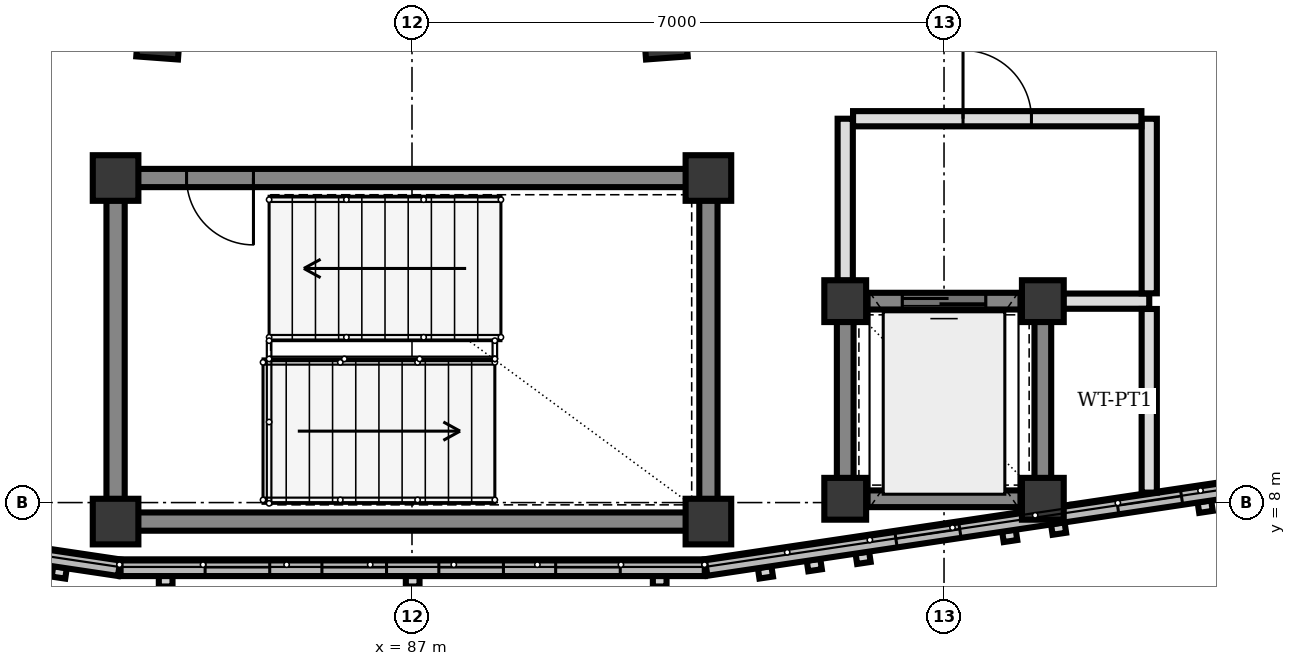
"""IFC4 building model, lengths in metres.
Left out: names, types, materials, properties, quantities, classifications, styles, units other than length and angle.
Written with IfcOpenShell. Run it as: python <this file> out.ifc"""

import sys

from ifc_helpers import new_model, si_unit, direction, frame, frame_2d, origin, origin_2d, place, context, subcontext, project, spatial, rectangle, extrude, element, fill, save


model = new_model("IFC4")
c1 = context("Model", 3, precision=1e-05, world=origin(), true_north=direction((0.0, 1.0)))
c2 = subcontext(c1, "Body", "Model", "MODEL_VIEW")
j1 = project(units=[si_unit("LENGTHUNIT", "METRE"), si_unit("PLANEANGLEUNIT", "RADIAN")], contexts=[c1])
p1 = place(None, origin())
s1 = spatial("IfcSite", under=j1, at=p1, CompositionType="ELEMENT")
p2 = place(p1, origin())
s2 = spatial("IfcBuilding", under=s1, at=p2, CompositionType="ELEMENT")
p3 = place(p2, frame((0.0, 0.0, 8.5)))
s3 = spatial("IfcBuildingStorey", under=s2, at=p3, CompositionType="ELEMENT", Elevation=8.5)
for number, where, z_axis, x_axis in (
    (1, (83.1, 7.75, 0.0), (0.0, 0.0, 1.0), (1.0, 0.0, 0.0)),
    (2, (90.9, 7.75, 0.0), (0.0, 0.0, 1.0), (1.0, 0.0, 0.0)),
    (3, (90.9, 12.27, 0.0), (0.0, 0.0, 1.0), (1.0, 0.0, 0.0)),
    (4, (83.1, 12.27, 0.0), (0.0, 0.0, 1.0), (1.0, 0.0, 0.0)),
):
    element("IfcColumn", number, at=place(p3, frame(where, z_axis=z_axis, x_axis=x_axis)), inside=s3, PredefinedType="COLUMN", context=c2, shape_type="SweptSolid", body=[
        extrude(rectangle(XDim=0.6, YDim=0.6, at=origin_2d()), origin(), (0.0, 0.0, 1.0), 4.0),
    ])
for number, where, z_axis, x_axis in (
    (5, (92.7, 8.05, 0.0), (0.0, 0.0, 1.0), (1.0, 0.0, 0.0)),
    (6, (95.3, 8.05, 0.0), (0.0, 0.0, 1.0), (1.0, 0.0, 0.0)),
    (7, (95.3, 10.65, 0.0), (0.0, 0.0, 1.0), (1.0, 0.0, 0.0)),
    (8, (92.7, 10.65, 0.0), (0.0, 0.0, 1.0), (1.0, 0.0, 0.0)),
    (9, (83.667, 14.124, 0.0), (0.0, 0.0, 1.0), (-0.074, -0.997, 0.0)),
    (10, (90.333, 14.124, 0.0), (0.0, 0.0, 1.0), (0.074, -0.997, 0.0)),
):
    element("IfcColumn", number, at=place(p3, frame(where, z_axis=z_axis, x_axis=x_axis)), inside=s3, PredefinedType="COLUMN", context=c2, shape_type="SweptSolid", body=[
        extrude(rectangle(XDim=0.55, YDim=0.55, at=origin_2d()), origin(), (0.0, 0.0, 1.0), 4.0),
    ])
p4 = place(p3, frame((83.148, 7.143, 0.0), z_axis=(0.0, 0.0, 1.0), x_axis=(-0.989027735747, 0.147729949309, 0.0)))
e11 = element("IfcWall", 11, at=p4, inside=s3, PredefinedType="SOLIDWALL", context=c2, shape_type="SweptSolid", body=[
    extrude(rectangle(XDim=7.392, YDim=0.22, at=frame_2d((3.696, 0.0))), origin(), (0.0, 0.0, 1.0), 3.55),
])
p5 = place(p4, frame((1.053, 0.0, 0.85)))
e12 = element("IfcOpeningElement", 12, at=p5, cuts=e11, PredefinedType="OPENING", context=c2, shape_type="SweptSolid", body=[
    extrude(rectangle(XDim=0.85, YDim=1.25, at=frame_2d((0.425, 0.625))), frame((0.0, 0.12, 0.0), z_axis=(0.0, -1.0, 0.0), x_axis=(1.0, 0.0, 0.0)), (0.0, 0.0, 1.0), 0.24),
])
p6 = place(p4, frame((2.532, 0.0, 0.85)))
e13 = element("IfcOpeningElement", 13, at=p6, cuts=e11, PredefinedType="OPENING", context=c2, shape_type="SweptSolid", body=[
    extrude(rectangle(XDim=0.85, YDim=1.25, at=frame_2d((0.425, 0.625))), frame((0.0, 0.12, 0.0), z_axis=(0.0, -1.0, 0.0), x_axis=(1.0, 0.0, 0.0)), (0.0, 0.0, 1.0), 0.24),
])
p7 = place(p4, frame((4.01, 0.0, 0.85)))
e14 = element("IfcOpeningElement", 14, at=p7, cuts=e11, PredefinedType="OPENING", context=c2, shape_type="SweptSolid", body=[
    extrude(rectangle(XDim=0.85, YDim=1.25, at=frame_2d((0.425, 0.625))), frame((0.0, 0.12, 0.0), z_axis=(0.0, -1.0, 0.0), x_axis=(1.0, 0.0, 0.0)), (0.0, 0.0, 1.0), 0.24),
])
p8 = place(p4, frame((5.489, 0.0, 0.85)))
e15 = element("IfcOpeningElement", 15, at=p8, cuts=e11, PredefinedType="OPENING", context=c2, shape_type="SweptSolid", body=[
    extrude(rectangle(XDim=0.85, YDim=1.25, at=frame_2d((0.425, 0.625))), frame((0.0, 0.12, 0.0), z_axis=(0.0, -1.0, 0.0), x_axis=(1.0, 0.0, 0.0)), (0.0, 0.0, 1.0), 0.24),
])
p9 = place(p3, frame((90.852, 7.143, 0.0), z_axis=(0.0, 0.0, 1.0), x_axis=(-1.0, 0.0, 0.0)))
e16 = element("IfcWall", 16, at=p9, inside=s3, PredefinedType="SOLIDWALL", context=c2, shape_type="SweptSolid", body=[
    extrude(rectangle(XDim=7.686, YDim=0.22, at=frame_2d((3.843, 0.0))), origin(), (0.0, 0.0, 1.0), 3.55),
])
p10 = place(p9, frame((1.112, 0.0, 0.85)))
e17 = element("IfcOpeningElement", 17, at=p10, cuts=e16, PredefinedType="OPENING", context=c2, shape_type="SweptSolid", body=[
    extrude(rectangle(XDim=0.85, YDim=1.25, at=frame_2d((0.425, 0.625))), frame((0.0, 0.12, 0.0), z_axis=(0.0, -1.0, 0.0), x_axis=(1.0, 0.0, 0.0)), (0.0, 0.0, 1.0), 0.24),
])
p11 = place(p9, frame((2.649, 0.0, 0.85)))
e18 = element("IfcOpeningElement", 18, at=p11, cuts=e16, PredefinedType="OPENING", context=c2, shape_type="SweptSolid", body=[
    extrude(rectangle(XDim=0.85, YDim=1.25, at=frame_2d((0.425, 0.625))), frame((0.0, 0.12, 0.0), z_axis=(0.0, -1.0, 0.0), x_axis=(1.0, 0.0, 0.0)), (0.0, 0.0, 1.0), 0.24),
])
p12 = place(p9, frame((4.187, 0.0, 0.85)))
e19 = element("IfcOpeningElement", 19, at=p12, cuts=e16, PredefinedType="OPENING", context=c2, shape_type="SweptSolid", body=[
    extrude(rectangle(XDim=0.85, YDim=1.25, at=frame_2d((0.425, 0.625))), frame((0.0, 0.12, 0.0), z_axis=(0.0, -1.0, 0.0), x_axis=(1.0, 0.0, 0.0)), (0.0, 0.0, 1.0), 0.24),
])
p13 = place(p9, frame((5.724, 0.0, 0.85)))
e20 = element("IfcOpeningElement", 20, at=p13, cuts=e16, PredefinedType="OPENING", context=c2, shape_type="SweptSolid", body=[
    extrude(rectangle(XDim=0.85, YDim=1.25, at=frame_2d((0.425, 0.625))), frame((0.0, 0.12, 0.0), z_axis=(0.0, -1.0, 0.0), x_axis=(1.0, 0.0, 0.0)), (0.0, 0.0, 1.0), 0.24),
])
p14 = place(p3, frame((98.163, 8.235, 0.0), z_axis=(0.0, 0.0, 1.0), x_axis=(-0.989032314976, -0.147699288869, 0.0)))
e21 = element("IfcWall", 21, at=p14, inside=s3, PredefinedType="SOLIDWALL", context=c2, shape_type="SweptSolid", body=[
    extrude(rectangle(XDim=7.374, YDim=0.22, at=frame_2d((3.687, 0.0))), origin(), (0.0, 0.0, 1.0), 3.55),
])
p15 = place(p14, frame((1.05, 0.0, 0.85)))
e22 = element("IfcOpeningElement", 22, at=p15, cuts=e21, PredefinedType="OPENING", context=c2, shape_type="SweptSolid", body=[
    extrude(rectangle(XDim=0.85, YDim=1.25, at=frame_2d((0.425, 0.625))), frame((0.0, 0.12, 0.0), z_axis=(0.0, -1.0, 0.0), x_axis=(1.0, 0.0, 0.0)), (0.0, 0.0, 1.0), 0.24),
])
p16 = place(p14, frame((3.999, 0.0, 0.85)))
e23 = element("IfcOpeningElement", 23, at=p16, cuts=e21, PredefinedType="OPENING", context=c2, shape_type="SweptSolid", body=[
    extrude(rectangle(XDim=0.85, YDim=1.25, at=frame_2d((0.425, 0.625))), frame((0.0, 0.12, 0.0), z_axis=(0.0, -1.0, 0.0), x_axis=(1.0, 0.0, 0.0)), (0.0, 0.0, 1.0), 0.24),
])
for number, where, z_axis, x_axis in (
    (24, (83.1, 8.042, 0.0), (0.0, 0.0, 1.0), (0.0, 1.0, 0.0)),
    (25, (90.9, 11.978, 0.0), (0.0, 0.0, 1.0), (0.0, -1.0, 0.0)),
):
    element("IfcWall", number, at=place(p3, frame(where, z_axis=z_axis, x_axis=x_axis)), inside=s3, PredefinedType="SHEAR", context=c2, shape_type="SweptSolid", body=[
        extrude(rectangle(XDim=3.936, YDim=0.24, at=frame_2d((1.968, 0.0))), origin(), (0.0, 0.0, 1.0), 3.74),
    ])
p17 = place(p3, frame((90.608, 7.75, 0.0), z_axis=(0.0, 0.0, 1.0), x_axis=(-1.0, 0.0, 0.0)))
e26 = element("IfcWall", 26, at=p17, inside=s3, PredefinedType="SHEAR", context=c2, shape_type="SweptSolid", body=[
    extrude(rectangle(XDim=7.216, YDim=0.24, at=frame_2d((3.608, 0.0))), origin(), (0.0, 0.0, 1.0), 3.74),
])
p18 = place(p3, frame((90.608, 12.27, 0.0), z_axis=(0.0, 0.0, 1.0), x_axis=(-1.0, 0.0, 0.0)))
e27 = element("IfcWall", 27, at=p18, inside=s3, PredefinedType="SHEAR", context=c2, shape_type="SweptSolid", body=[
    extrude(rectangle(XDim=7.216, YDim=0.24, at=frame_2d((3.608, 0.0))), origin(), (0.0, 0.0, 1.0), 3.74),
])
p19 = place(p18, frame((5.694, 0.0, 0.0)))
e28 = element("IfcOpeningElement", 28, at=p19, cuts=e27, PredefinedType="OPENING", context=c2, shape_type="SweptSolid", body=[
    extrude(rectangle(XDim=0.88, YDim=2.1, at=frame_2d((0.44, 1.05))), frame((0.0, 0.13, 0.0), z_axis=(0.0, -1.0, 0.0), x_axis=(1.0, 0.0, 0.0)), (0.0, 0.0, 1.0), 0.26),
])
p20 = place(p3, frame((92.967, 8.05, 0.0), z_axis=(0.0, 0.0, 1.0), x_axis=(1.0, 0.0, 0.0)))
e29 = element("IfcWall", 29, at=p20, inside=s3, PredefinedType="SHEAR", context=c2, shape_type="SweptSolid", body=[
    extrude(rectangle(XDim=2.066, YDim=0.22, at=frame_2d((1.033, 0.0))), origin(), (0.0, 0.0, 1.0), 3.74),
])
p21 = place(p3, frame((95.3, 8.317, 0.0), z_axis=(0.0, 0.0, 1.0), x_axis=(0.0, 1.0, 0.0)))
e30 = element("IfcWall", 30, at=p21, inside=s3, PredefinedType="SHEAR", context=c2, shape_type="SweptSolid", body=[
    extrude(rectangle(XDim=2.066, YDim=0.22, at=frame_2d((1.033, 0.0))), origin(), (0.0, 0.0, 1.0), 3.74),
])
p22 = place(p3, frame((95.033, 10.65, 0.0), z_axis=(0.0, 0.0, 1.0), x_axis=(-1.0, 0.0, 0.0)))
e31 = element("IfcWall", 31, at=p22, inside=s3, PredefinedType="SHEAR", context=c2, shape_type="SweptSolid", body=[
    extrude(rectangle(XDim=2.066, YDim=0.22, at=frame_2d((1.033, 0.0))), origin(), (0.0, 0.0, 1.0), 3.74),
])
p23 = place(p22, frame((0.483, 0.0, 0.0)))
e32 = element("IfcOpeningElement", 32, at=p23, cuts=e31, PredefinedType="OPENING", context=c2, shape_type="SweptSolid", body=[
    extrude(rectangle(XDim=1.1, YDim=2.15, at=frame_2d((0.55, 1.075))), frame((0.0, 0.12, 0.0), z_axis=(0.0, -1.0, 0.0), x_axis=(1.0, 0.0, 0.0)), (0.0, 0.0, 1.0), 0.24),
])
p24 = place(p3, frame((92.7, 10.383, 0.0), z_axis=(0.0, 0.0, 1.0), x_axis=(0.0, -1.0, 0.0)))
e33 = element("IfcWall", 33, at=p24, inside=s3, PredefinedType="SHEAR", context=c2, shape_type="SweptSolid", body=[
    extrude(rectangle(XDim=2.066, YDim=0.22, at=frame_2d((1.033, 0.0))), origin(), (0.0, 0.0, 1.0), 3.74),
])
p25 = place(p3, frame((92.7, 10.917, 0.0), z_axis=(0.0, 0.0, 1.0), x_axis=(0.0, 1.0, 0.0)))
e34 = element("IfcWall", 34, at=p25, inside=s3, PredefinedType="PARTITIONING", context=c2, shape_type="SweptSolid", body=[
    extrude(rectangle(XDim=2.133, YDim=0.2, at=frame_2d((1.066, 0.0))), origin(), (0.0, 0.0, 1.0), 3.7),
])
p26 = place(p3, frame((95.567, 10.65, 0.0), z_axis=(0.0, 0.0, 1.0), x_axis=(1.0, 0.0, 0.0)))
e35 = element("IfcWall", 35, at=p26, inside=s3, PredefinedType="PARTITIONING", context=c2, shape_type="SweptSolid", body=[
    extrude(rectangle(XDim=1.133, YDim=0.2, at=frame_2d((0.566, 0.0))), origin(), (0.0, 0.0, 1.0), 3.7),
])
p27 = place(p3, frame((96.7, 8.131, 0.0), z_axis=(0.0, 0.0, 1.0), x_axis=(0.0, 1.0, 0.0)))
e36 = element("IfcWall", 36, at=p27, inside=s3, PredefinedType="PARTITIONING", context=c2, shape_type="SweptSolid", body=[
    extrude(rectangle(XDim=2.416, YDim=0.2, at=frame_2d((1.208, 0.0))), origin(), (0.0, 0.0, 1.0), 3.7),
])
p28 = place(p3, frame((96.7, 10.753, 0.0), z_axis=(0.0, 0.0, 1.0), x_axis=(0.0, 1.0, 0.0)))
e37 = element("IfcWall", 37, at=p28, inside=s3, PredefinedType="PARTITIONING", context=c2, shape_type="SweptSolid", body=[
    extrude(rectangle(XDim=2.297, YDim=0.2, at=frame_2d((1.148, 0.0))), origin(), (0.0, 0.0, 1.0), 3.7),
])
p29 = place(p3, frame((92.803, 13.05, 0.0), z_axis=(0.0, 0.0, 1.0), x_axis=(1.0, 0.0, 0.0)))
e38 = element("IfcWall", 38, at=p29, inside=s3, PredefinedType="PARTITIONING", context=c2, shape_type="SweptSolid", body=[
    extrude(rectangle(XDim=3.794, YDim=0.2, at=frame_2d((1.897, 0.0))), origin(), (0.0, 0.0, 1.0), 3.7),
])
p30 = place(p29, frame((1.447, 0.0, 0.0)))
e39 = element("IfcOpeningElement", 39, at=p30, cuts=e38, PredefinedType="OPENING", context=c2, shape_type="SweptSolid", body=[
    extrude(rectangle(XDim=0.9, YDim=2.2, at=frame_2d((0.45, 1.1))), frame((0.0, 0.11, 0.0), z_axis=(0.0, -1.0, 0.0), x_axis=(1.0, 0.0, 0.0)), (0.0, 0.0, 1.0), 0.22),
])
p31 = place(p10, origin())
e40 = element("IfcWindow", 40, at=p31, inside=s3, PartitioningType="SINGLE_PANEL", PredefinedType="WINDOW", context=c2, shape_type="SweptSolid", body=[
    extrude(rectangle(XDim=0.85, YDim=1.25, at=frame_2d((0.425, 0.625))), frame((0.0, 0.03, 0.0), z_axis=(0.0, -1.0, 0.0), x_axis=(1.0, 0.0, 0.0)), (0.0, 0.0, 1.0), 0.06),
])
fill(e17, e40)
p32 = place(p11, origin())
e41 = element("IfcWindow", 41, at=p32, inside=s3, PartitioningType="SINGLE_PANEL", PredefinedType="WINDOW", context=c2, shape_type="SweptSolid", body=[
    extrude(rectangle(XDim=0.85, YDim=1.25, at=frame_2d((0.425, 0.625))), frame((0.0, 0.03, 0.0), z_axis=(0.0, -1.0, 0.0), x_axis=(1.0, 0.0, 0.0)), (0.0, 0.0, 1.0), 0.06),
])
fill(e18, e41)
p33 = place(p12, origin())
e42 = element("IfcWindow", 42, at=p33, inside=s3, PartitioningType="SINGLE_PANEL", PredefinedType="WINDOW", context=c2, shape_type="SweptSolid", body=[
    extrude(rectangle(XDim=0.85, YDim=1.25, at=frame_2d((0.425, 0.625))), frame((0.0, 0.03, 0.0), z_axis=(0.0, -1.0, 0.0), x_axis=(1.0, 0.0, 0.0)), (0.0, 0.0, 1.0), 0.06),
])
fill(e19, e42)
p34 = place(p13, origin())
e43 = element("IfcWindow", 43, at=p34, inside=s3, PartitioningType="SINGLE_PANEL", PredefinedType="WINDOW", context=c2, shape_type="SweptSolid", body=[
    extrude(rectangle(XDim=0.85, YDim=1.25, at=frame_2d((0.425, 0.625))), frame((0.0, 0.03, 0.0), z_axis=(0.0, -1.0, 0.0), x_axis=(1.0, 0.0, 0.0)), (0.0, 0.0, 1.0), 0.06),
])
fill(e20, e43)
p35 = place(p15, origin())
e44 = element("IfcWindow", 44, at=p35, inside=s3, PartitioningType="SINGLE_PANEL", PredefinedType="WINDOW", context=c2, shape_type="SweptSolid", body=[
    extrude(rectangle(XDim=0.85, YDim=1.25, at=frame_2d((0.425, 0.625))), frame((0.0, 0.03, 0.0), z_axis=(0.0, -1.0, 0.0), x_axis=(1.0, 0.0, 0.0)), (0.0, 0.0, 1.0), 0.06),
])
fill(e22, e44)
p36 = place(p16, origin())
e45 = element("IfcWindow", 45, at=p36, inside=s3, PartitioningType="SINGLE_PANEL", PredefinedType="WINDOW", context=c2, shape_type="SweptSolid", body=[
    extrude(rectangle(XDim=0.85, YDim=1.25, at=frame_2d((0.425, 0.625))), frame((0.0, 0.03, 0.0), z_axis=(0.0, -1.0, 0.0), x_axis=(1.0, 0.0, 0.0)), (0.0, 0.0, 1.0), 0.06),
])
fill(e23, e45)
p37 = place(p19, origin())
e46 = element("IfcDoor", 46, at=p37, inside=s3, OperationType="SINGLE_SWING_LEFT", PredefinedType="DOOR", context=c2, shape_type="SweptSolid", body=[
    extrude(rectangle(XDim=0.88, YDim=2.1, at=frame_2d((0.44, 1.05))), frame((0.0, 0.025, 0.0), z_axis=(0.0, -1.0, 0.0), x_axis=(1.0, 0.0, 0.0)), (0.0, 0.0, 1.0), 0.05),
])
fill(e28, e46)
p38 = place(p23, origin())
e47 = element("IfcDoor", 47, at=p38, inside=s3, OperationType="DOUBLE_DOOR_SLIDING", PredefinedType="DOOR", context=c2, shape_type="SweptSolid", body=[
    extrude(rectangle(XDim=1.1, YDim=2.15, at=frame_2d((0.55, 1.075))), frame((0.0, 0.025, 0.0), z_axis=(0.0, -1.0, 0.0), x_axis=(1.0, 0.0, 0.0)), (0.0, 0.0, 1.0), 0.05),
])
fill(e32, e47)
p39 = place(p30, origin())
e48 = element("IfcDoor", 48, at=p39, inside=s3, OperationType="SINGLE_SWING_LEFT", PredefinedType="DOOR", context=c2, shape_type="SweptSolid", body=[
    extrude(rectangle(XDim=0.9, YDim=2.2, at=frame_2d((0.45, 1.1))), frame((0.0, 0.025, 0.0), z_axis=(0.0, -1.0, 0.0), x_axis=(1.0, 0.0, 0.0)), (0.0, 0.0, 1.0), 0.05),
])
fill(e39, e48)
save(model, sys.argv[1])
